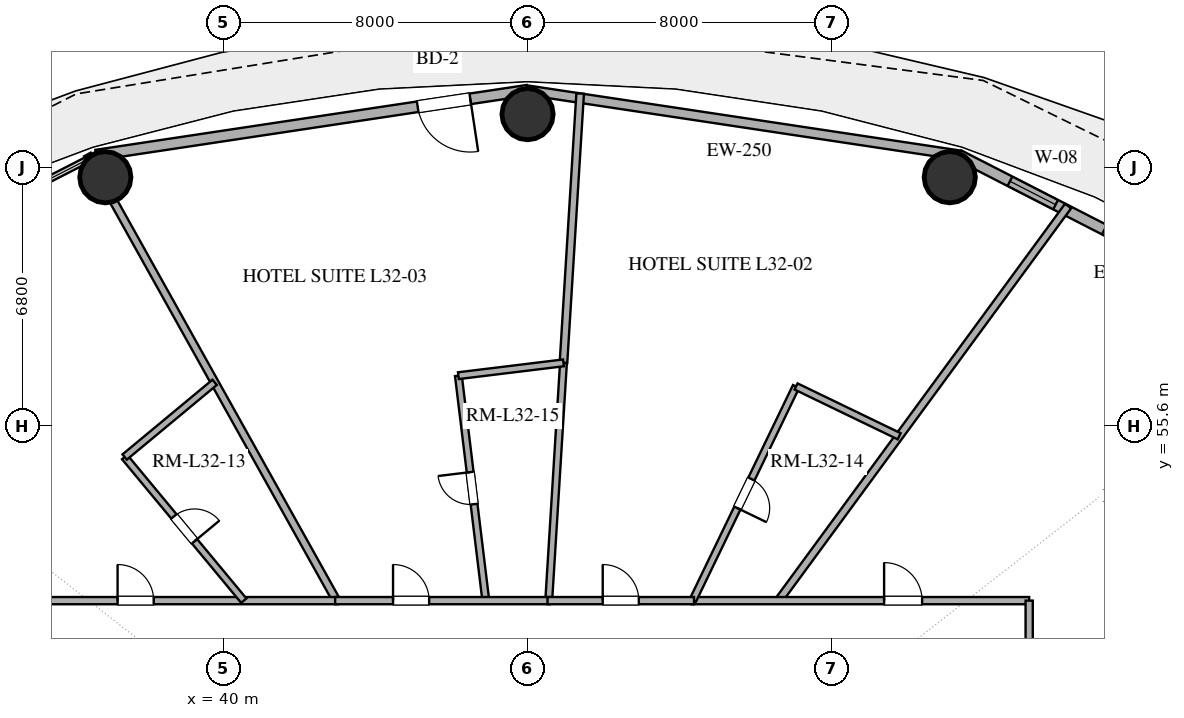
"""IFC4 building model, lengths in metres.
Left out: names, types, materials, properties, quantities, classifications, styles, units other than length and angle.
Written with IfcOpenShell. Run it as: python <this file> out.ifc"""

import sys

from ifc_helpers import new_model, si_unit, direction, frame, frame_2d, origin, origin_2d, place, context, subcontext, project, spatial, rectangle, hollow_circle, extrude, element, fill, save


model = new_model("IFC4")
c1 = context("Model", 3, precision=1e-05, world=origin(), true_north=direction((0.0, 1.0)))
c2 = subcontext(c1, "Body", "Model", "MODEL_VIEW")
j1 = project(units=[si_unit("LENGTHUNIT", "METRE"), si_unit("PLANEANGLEUNIT", "RADIAN")], contexts=[c1])
p1 = place(None, origin())
s1 = spatial("IfcSite", under=j1, at=p1, CompositionType="ELEMENT")
p2 = place(p1, origin())
s2 = spatial("IfcBuilding", under=s1, at=p2, CompositionType="ELEMENT")
p3 = place(p2, frame((0.0, 0.0, 127.2)))
s3 = spatial("IfcBuildingStorey", under=s2, at=p3, CompositionType="ELEMENT", Elevation=127.2)
for number, where, z_axis, x_axis in (
    (1, (59.11, 62.141, 0.0), (0.0, 0.0, 1.0), (1.0, 0.0, 0.0)),
    (2, (48.0, 63.8, 0.0), (0.0, 0.0, 1.0), (1.0, 0.0, 0.0)),
    (3, (36.89, 62.141, 0.0), (0.0, 0.0, 1.0), (1.0, 0.0, 0.0)),
):
    element("IfcColumn", number, at=place(p3, frame(where, z_axis=z_axis, x_axis=x_axis)), inside=s3, PredefinedType="COLUMN", context=c2, shape_type="SweptSolid", body=[
        extrude(hollow_circle(Radius=0.675, WallThickness=0.036, at=origin_2d()), origin(), (0.0, 0.0, 1.0), 3.38),
    ])
p4 = place(p3, frame((68.84, 57.86, 0.0), z_axis=(0.0, 0.0, 1.0), x_axis=(-0.889959505023, 0.45603955905, 0.0)))
e4 = element("IfcWall", 4, at=p4, inside=s3, PredefinedType="SOLIDWALL", context=c2, shape_type="SweptSolid", body=[
    extrude(rectangle(XDim=10.662, YDim=0.28, at=frame_2d((5.331, 0.0))), origin(), (0.0, 0.0, 1.0), 3.38),
])
p5 = place(p4, frame((2.475, 0.0, 0.85)))
e5 = element("IfcOpeningElement", 5, at=p5, cuts=e4, PredefinedType="OPENING", context=c2, shape_type="SweptSolid", body=[
    extrude(rectangle(XDim=1.5, YDim=2.0, at=frame_2d((0.75, 1.0))), frame((0.0, 0.15, 0.0), z_axis=(0.0, -1.0, 0.0), x_axis=(1.0, 0.0, 0.0)), (0.0, 0.0, 1.0), 0.3),
])
p6 = place(p4, frame((4.86, 0.0, 0.85)))
e6 = element("IfcOpeningElement", 6, at=p6, cuts=e4, PredefinedType="OPENING", context=c2, shape_type="SweptSolid", body=[
    extrude(rectangle(XDim=1.5, YDim=2.0, at=frame_2d((0.75, 1.0))), frame((0.0, 0.15, 0.0), z_axis=(0.0, -1.0, 0.0), x_axis=(1.0, 0.0, 0.0)), (0.0, 0.0, 1.0), 0.3),
])
p7 = place(p4, frame((7.803, 0.0, 0.85)))
e7 = element("IfcOpeningElement", 7, at=p7, cuts=e4, PredefinedType="OPENING", context=c2, shape_type="SweptSolid", body=[
    extrude(rectangle(XDim=1.35, YDim=1.8, at=frame_2d((0.675, 0.9))), frame((0.0, 0.15, 0.0), z_axis=(0.0, -1.0, 0.0), x_axis=(1.0, 0.0, 0.0)), (0.0, 0.0, 1.0), 0.3),
])
p8 = place(p3, frame((59.351, 62.723, 0.0), z_axis=(0.0, 0.0, 1.0), x_axis=(-0.988877774656, 0.148730450117, 0.0)))
e8 = element("IfcWall", 8, at=p8, inside=s3, PredefinedType="SOLIDWALL", context=c2, shape_type="SweptSolid", body=[
    extrude(rectangle(XDim=11.479, YDim=0.25, at=frame_2d((5.74, 0.0))), origin(), (0.0, 0.0, 1.0), 3.38),
])
p9 = place(p3, frame((48.0, 64.43, 0.0), z_axis=(0.0, 0.0, 1.0), x_axis=(-0.988877774656, -0.148730450117, 0.0)))
e9 = element("IfcWall", 9, at=p9, inside=s3, PredefinedType="SOLIDWALL", context=c2, shape_type="SweptSolid", body=[
    extrude(rectangle(XDim=11.479, YDim=0.28, at=frame_2d((5.74, 0.0))), origin(), (0.0, 0.0, 1.0), 3.38),
])
p10 = place(p9, frame((1.524, 0.0, 0.0)))
e10 = element("IfcOpeningElement", 10, at=p10, cuts=e9, PredefinedType="OPENING", context=c2, shape_type="SweptSolid", body=[
    extrude(rectangle(XDim=1.4, YDim=2.2, at=frame_2d((0.7, 1.1))), frame((0.0, 0.15, 0.0), z_axis=(0.0, -1.0, 0.0), x_axis=(1.0, 0.0, 0.0)), (0.0, 0.0, 1.0), 0.3),
])
p11 = place(p3, frame((73.888, 51.938, 0.0), z_axis=(0.0, 0.0, 1.0), x_axis=(-0.933575508152, -0.358380762009, 0.0)))
e11 = element("IfcWall", 11, at=p11, inside=s3, PredefinedType="PARTITIONING", context=c2, shape_type="SweptSolid", body=[
    extrude(rectangle(XDim=13.591, YDim=0.2, at=frame_2d((6.796, 0.0))), origin(), (0.0, 0.0, 1.0), 2.74),
])
p12 = place(p3, frame((54.605, 51.0, 0.0), z_axis=(0.0, 0.0, 1.0), x_axis=(0.591626609971, 0.806212102597, 0.0)))
e12 = element("IfcWall", 12, at=p12, inside=s3, PredefinedType="PARTITIONING", context=c2, shape_type="SweptSolid", body=[
    extrude(rectangle(XDim=12.879, YDim=0.2, at=frame_2d((6.439, 0.0))), origin(), (0.0, 0.0, 1.0), 2.74),
])
p13 = place(p3, frame((49.384, 64.343, 0.0), z_axis=(0.0, 0.0, 1.0), x_axis=(-0.061825960445, -0.998086945419, 0.0)))
e13 = element("IfcWall", 13, at=p13, inside=s3, PredefinedType="PARTITIONING", context=c2, shape_type="SweptSolid", body=[
    extrude(rectangle(XDim=7.1, YDim=0.2, at=frame_2d((3.55, 0.0))), origin(), (0.0, 0.0, 1.0), 2.74),
])
p14 = place(p3, frame((42.974, 51.0, 0.0), z_axis=(0.0, 0.0, 1.0), x_axis=(-0.487587337482, 0.873074216964, 0.0)))
e14 = element("IfcWall", 14, at=p14, inside=s3, PredefinedType="PARTITIONING", context=c2, shape_type="SweptSolid", body=[
    extrude(rectangle(XDim=13.446, YDim=0.2, at=frame_2d((6.723, 0.0))), origin(), (0.0, 0.0, 1.0), 2.74),
])
p15 = place(p3, frame((52.31, 51.0, 0.0), z_axis=(0.0, 0.0, 1.0), x_axis=(1.0, 0.0, 0.0)))
e15 = element("IfcWall", 15, at=p15, inside=s3, PredefinedType="PARTITIONING", context=c2, shape_type="SweptSolid", body=[
    extrude(rectangle(XDim=8.89, YDim=0.19, at=frame_2d((4.445, 0.0))), origin(), (0.0, 0.0, 1.0), 2.74),
])
p16 = place(p15, frame((5.073, 0.0, 0.0)))
e16 = element("IfcOpeningElement", 16, at=p16, cuts=e15, PredefinedType="OPENING", context=c2, shape_type="SweptSolid", body=[
    extrude(rectangle(XDim=1.0, YDim=2.2, at=frame_2d((0.5, 1.1))), frame((0.0, 0.105, 0.0), z_axis=(0.0, -1.0, 0.0), x_axis=(1.0, 0.0, 0.0)), (0.0, 0.0, 1.0), 0.21),
])
p17 = place(p3, frame((48.945, 57.256, 0.0), z_axis=(0.0, 0.0, 1.0), x_axis=(-0.061849673623, -0.998085476236, 0.0)))
e17 = element("IfcWall", 17, at=p17, inside=s3, PredefinedType="PLUMBINGWALL", context=c2, shape_type="SweptSolid", body=[
    extrude(rectangle(XDim=6.268, YDim=0.18, at=frame_2d((3.134, 0.0))), origin(), (0.0, 0.0, 1.0), 2.74),
])
p18 = place(p3, frame((55.066, 56.635, 0.0), z_axis=(0.0, 0.0, 1.0), x_axis=(-0.434810168298, -0.900522136066, 0.0)))
e18 = element("IfcWall", 18, at=p18, inside=s3, PredefinedType="PLUMBINGWALL", context=c2, shape_type="SweptSolid", body=[
    extrude(rectangle(XDim=6.257, YDim=0.18, at=frame_2d((3.129, 0.0))), origin(), (0.0, 0.0, 1.0), 2.74),
])
p19 = place(p18, frame((2.704, 0.0, 0.0)))
e19 = element("IfcOpeningElement", 19, at=p19, cuts=e18, PredefinedType="OPENING", context=c2, shape_type="SweptSolid", body=[
    extrude(rectangle(XDim=0.85, YDim=2.1, at=frame_2d((0.425, 1.05))), frame((0.0, 0.1, 0.0), z_axis=(0.0, -1.0, 0.0), x_axis=(1.0, 0.0, 0.0)), (0.0, 0.0, 1.0), 0.2),
])
p20 = place(p3, frame((46.902, 51.0, 0.0), z_axis=(0.0, 0.0, 1.0), x_axis=(-0.121066182793, 0.992644437542, 0.0)))
e20 = element("IfcWall", 20, at=p20, inside=s3, PredefinedType="PLUMBINGWALL", context=c2, shape_type="SweptSolid", body=[
    extrude(rectangle(XDim=5.963, YDim=0.18, at=frame_2d((2.981, 0.0))), origin(), (0.0, 0.0, 1.0), 2.74),
])
p21 = place(p20, frame((2.556, 0.0, 0.0)))
e21 = element("IfcOpeningElement", 21, at=p21, cuts=e20, PredefinedType="OPENING", context=c2, shape_type="SweptSolid", body=[
    extrude(rectangle(XDim=0.85, YDim=2.1, at=frame_2d((0.425, 1.05))), frame((0.0, 0.1, 0.0), z_axis=(0.0, -1.0, 0.0), x_axis=(1.0, 0.0, 0.0)), (0.0, 0.0, 1.0), 0.2),
])
p22 = place(p3, frame((34.8, 51.0, 0.0), z_axis=(0.0, 0.0, 1.0), x_axis=(1.0, 0.0, 0.0)))
e22 = element("IfcWall", 22, at=p22, inside=s3, PredefinedType="PARTITIONING", context=c2, shape_type="SweptSolid", body=[
    extrude(rectangle(XDim=8.21, YDim=0.19, at=frame_2d((4.105, 0.0))), origin(), (0.0, 0.0, 1.0), 2.74),
])
p23 = place(p22, frame((2.412, 0.0, 0.0)))
e23 = element("IfcOpeningElement", 23, at=p23, cuts=e22, PredefinedType="OPENING", context=c2, shape_type="SweptSolid", body=[
    extrude(rectangle(XDim=0.95, YDim=2.15, at=frame_2d((0.475, 1.075))), frame((0.0, 0.105, 0.0), z_axis=(0.0, -1.0, 0.0), x_axis=(1.0, 0.0, 0.0)), (0.0, 0.0, 1.0), 0.21),
])
p24 = place(p3, frame((61.2, 51.0, 0.0), z_axis=(0.0, 0.0, 1.0), x_axis=(0.0, -1.0, 0.0)))
e24 = element("IfcWall", 24, at=p24, inside=s3, PredefinedType="PARTITIONING", context=c2, shape_type="SweptSolid", body=[
    extrude(rectangle(XDim=9.315, YDim=0.19, at=frame_2d((4.657, 0.0))), origin(), (0.0, 0.0, 1.0), 2.74),
])
p25 = place(p24, frame((6.132, 0.0, 0.0)))
e25 = element("IfcOpeningElement", 25, at=p25, cuts=e24, PredefinedType="OPENING", context=c2, shape_type="SweptSolid", body=[
    extrude(rectangle(XDim=0.95, YDim=2.15, at=frame_2d((0.475, 1.075))), frame((0.0, 0.105, 0.0), z_axis=(0.0, -1.0, 0.0), x_axis=(1.0, 0.0, 0.0)), (0.0, 0.0, 1.0), 0.21),
])
p26 = place(p3, frame((37.398, 54.778, 0.0), z_axis=(0.0, 0.0, 1.0), x_axis=(0.638549285416, -0.769580931478, 0.0)))
e26 = element("IfcWall", 26, at=p26, inside=s3, PredefinedType="PLUMBINGWALL", context=c2, shape_type="SweptSolid", body=[
    extrude(rectangle(XDim=4.91, YDim=0.18, at=frame_2d((2.455, 0.0))), origin(), (0.0, 0.0, 1.0), 2.74),
])
p27 = place(p26, frame((2.03, 0.0, 0.0)))
e27 = element("IfcOpeningElement", 27, at=p27, cuts=e26, PredefinedType="OPENING", context=c2, shape_type="SweptSolid", body=[
    extrude(rectangle(XDim=0.85, YDim=2.1, at=frame_2d((0.425, 1.05))), frame((0.0, 0.1, 0.0), z_axis=(0.0, -1.0, 0.0), x_axis=(1.0, 0.0, 0.0)), (0.0, 0.0, 1.0), 0.2),
])
p28 = place(p3, frame((42.937, 51.0, 0.0), z_axis=(0.0, 0.0, 1.0), x_axis=(1.0, 0.0, 0.0)))
e28 = element("IfcWall", 28, at=p28, inside=s3, PredefinedType="PARTITIONING", context=c2, shape_type="SweptSolid", body=[
    extrude(rectangle(XDim=5.653, YDim=0.19, at=frame_2d((2.826, 0.0))), origin(), (0.0, 0.0, 1.0), 2.74),
])
p29 = place(p28, frame((1.524, 0.0, 0.0)))
e29 = element("IfcOpeningElement", 29, at=p29, cuts=e28, PredefinedType="OPENING", context=c2, shape_type="SweptSolid", body=[
    extrude(rectangle(XDim=0.95, YDim=2.15, at=frame_2d((0.475, 1.075))), frame((0.0, 0.105, 0.0), z_axis=(0.0, -1.0, 0.0), x_axis=(1.0, 0.0, 0.0)), (0.0, 0.0, 1.0), 0.21),
])
p30 = place(p3, frame((48.525, 51.0, 0.0), z_axis=(0.0, 0.0, 1.0), x_axis=(1.0, 0.0, 0.0)))
e30 = element("IfcWall", 30, at=p30, inside=s3, PredefinedType="PARTITIONING", context=c2, shape_type="SweptSolid", body=[
    extrude(rectangle(XDim=3.856, YDim=0.19, at=frame_2d((1.928, 0.0))), origin(), (0.0, 0.0, 1.0), 2.74),
])
p31 = place(p30, frame((1.453, 0.0, 0.0)))
e31 = element("IfcOpeningElement", 31, at=p31, cuts=e30, PredefinedType="OPENING", context=c2, shape_type="SweptSolid", body=[
    extrude(rectangle(XDim=0.95, YDim=2.15, at=frame_2d((0.475, 1.075))), frame((0.0, 0.105, 0.0), z_axis=(0.0, -1.0, 0.0), x_axis=(1.0, 0.0, 0.0)), (0.0, 0.0, 1.0), 0.21),
])
p32 = place(p3, frame((39.766, 56.743, 0.0), z_axis=(0.0, 0.0, 1.0), x_axis=(-0.769591554132, -0.638536482755, 0.0)))
e32 = element("IfcWall", 32, at=p32, inside=s3, PredefinedType="PLUMBINGWALL", context=c2, shape_type="SweptSolid", body=[
    extrude(rectangle(XDim=3.077, YDim=0.18, at=frame_2d((1.539, 0.0))), origin(), (0.0, 0.0, 1.0), 2.74),
])
p33 = place(p3, frame((57.779, 55.325, 0.0), z_axis=(0.0, 0.0, 1.0), x_axis=(-0.900534126875, 0.434785333623, 0.0)))
e33 = element("IfcWall", 33, at=p33, inside=s3, PredefinedType="PLUMBINGWALL", context=c2, shape_type="SweptSolid", body=[
    extrude(rectangle(XDim=3.012, YDim=0.18, at=frame_2d((1.506, 0.0))), origin(), (0.0, 0.0, 1.0), 2.74),
])
p34 = place(p3, frame((46.18, 56.919, 0.0), z_axis=(0.0, 0.0, 1.0), x_axis=(0.99264818918, 0.121035418441, 0.0)))
e34 = element("IfcWall", 34, at=p34, inside=s3, PredefinedType="PLUMBINGWALL", context=c2, shape_type="SweptSolid", body=[
    extrude(rectangle(XDim=2.786, YDim=0.18, at=frame_2d((1.393, 0.0))), origin(), (0.0, 0.0, 1.0), 2.74),
])
p35 = place(p7, origin())
e35 = element("IfcWindow", 35, at=p35, inside=s3, PartitioningType="SINGLE_PANEL", PredefinedType="WINDOW", context=c2, shape_type="SweptSolid", body=[
    extrude(rectangle(XDim=1.35, YDim=1.8, at=frame_2d((0.675, 0.9))), frame((0.0, 0.03, 0.0), z_axis=(0.0, -1.0, 0.0), x_axis=(1.0, 0.0, 0.0)), (0.0, 0.0, 1.0), 0.06),
])
fill(e7, e35)
p36 = place(p10, origin())
e36 = element("IfcDoor", 36, at=p36, inside=s3, OperationType="SINGLE_SWING_LEFT", PredefinedType="DOOR", context=c2, shape_type="SweptSolid", body=[
    extrude(rectangle(XDim=1.4, YDim=2.2, at=frame_2d((0.7, 1.1))), frame((0.0, 0.025, 0.0), z_axis=(0.0, -1.0, 0.0), x_axis=(1.0, 0.0, 0.0)), (0.0, 0.0, 1.0), 0.05),
])
fill(e10, e36)
p37 = place(p16, origin())
e37 = element("IfcDoor", 37, at=p37, inside=s3, OperationType="SINGLE_SWING_LEFT", PredefinedType="DOOR", context=c2, shape_type="SweptSolid", body=[
    extrude(rectangle(XDim=1.0, YDim=2.2, at=frame_2d((0.5, 1.1))), frame((0.0, 0.025, 0.0), z_axis=(0.0, -1.0, 0.0), x_axis=(1.0, 0.0, 0.0)), (0.0, 0.0, 1.0), 0.05),
])
fill(e16, e37)
p38 = place(p19, origin())
e38 = element("IfcDoor", 38, at=p38, inside=s3, OperationType="SINGLE_SWING_RIGHT", PredefinedType="DOOR", context=c2, shape_type="SweptSolid", body=[
    extrude(rectangle(XDim=0.85, YDim=2.1, at=frame_2d((0.425, 1.05))), frame((0.0, 0.025, 0.0), z_axis=(0.0, -1.0, 0.0), x_axis=(1.0, 0.0, 0.0)), (0.0, 0.0, 1.0), 0.05),
])
fill(e19, e38)
p39 = place(p21, origin())
e39 = element("IfcDoor", 39, at=p39, inside=s3, OperationType="SINGLE_SWING_RIGHT", PredefinedType="DOOR", context=c2, shape_type="SweptSolid", body=[
    extrude(rectangle(XDim=0.85, YDim=2.1, at=frame_2d((0.425, 1.05))), frame((0.0, 0.025, 0.0), z_axis=(0.0, -1.0, 0.0), x_axis=(1.0, 0.0, 0.0)), (0.0, 0.0, 1.0), 0.05),
])
fill(e21, e39)
p40 = place(p23, origin())
e40 = element("IfcDoor", 40, at=p40, inside=s3, OperationType="SINGLE_SWING_LEFT", PredefinedType="DOOR", context=c2, shape_type="SweptSolid", body=[
    extrude(rectangle(XDim=0.95, YDim=2.15, at=frame_2d((0.475, 1.075))), frame((0.0, 0.025, 0.0), z_axis=(0.0, -1.0, 0.0), x_axis=(1.0, 0.0, 0.0)), (0.0, 0.0, 1.0), 0.05),
])
fill(e23, e40)
p41 = place(p27, origin())
e41 = element("IfcDoor", 41, at=p41, inside=s3, OperationType="SINGLE_SWING_RIGHT", PredefinedType="DOOR", context=c2, shape_type="SweptSolid", body=[
    extrude(rectangle(XDim=0.85, YDim=2.1, at=frame_2d((0.425, 1.05))), frame((0.0, 0.025, 0.0), z_axis=(0.0, -1.0, 0.0), x_axis=(1.0, 0.0, 0.0)), (0.0, 0.0, 1.0), 0.05),
])
fill(e27, e41)
p42 = place(p29, origin())
e42 = element("IfcDoor", 42, at=p42, inside=s3, OperationType="SINGLE_SWING_LEFT", PredefinedType="DOOR", context=c2, shape_type="SweptSolid", body=[
    extrude(rectangle(XDim=0.95, YDim=2.15, at=frame_2d((0.475, 1.075))), frame((0.0, 0.025, 0.0), z_axis=(0.0, -1.0, 0.0), x_axis=(1.0, 0.0, 0.0)), (0.0, 0.0, 1.0), 0.05),
])
fill(e29, e42)
p43 = place(p31, origin())
e43 = element("IfcDoor", 43, at=p43, inside=s3, OperationType="SINGLE_SWING_LEFT", PredefinedType="DOOR", context=c2, shape_type="SweptSolid", body=[
    extrude(rectangle(XDim=0.95, YDim=2.15, at=frame_2d((0.475, 1.075))), frame((0.0, 0.025, 0.0), z_axis=(0.0, -1.0, 0.0), x_axis=(1.0, 0.0, 0.0)), (0.0, 0.0, 1.0), 0.05),
])
fill(e31, e43)
save(model, sys.argv[1])
